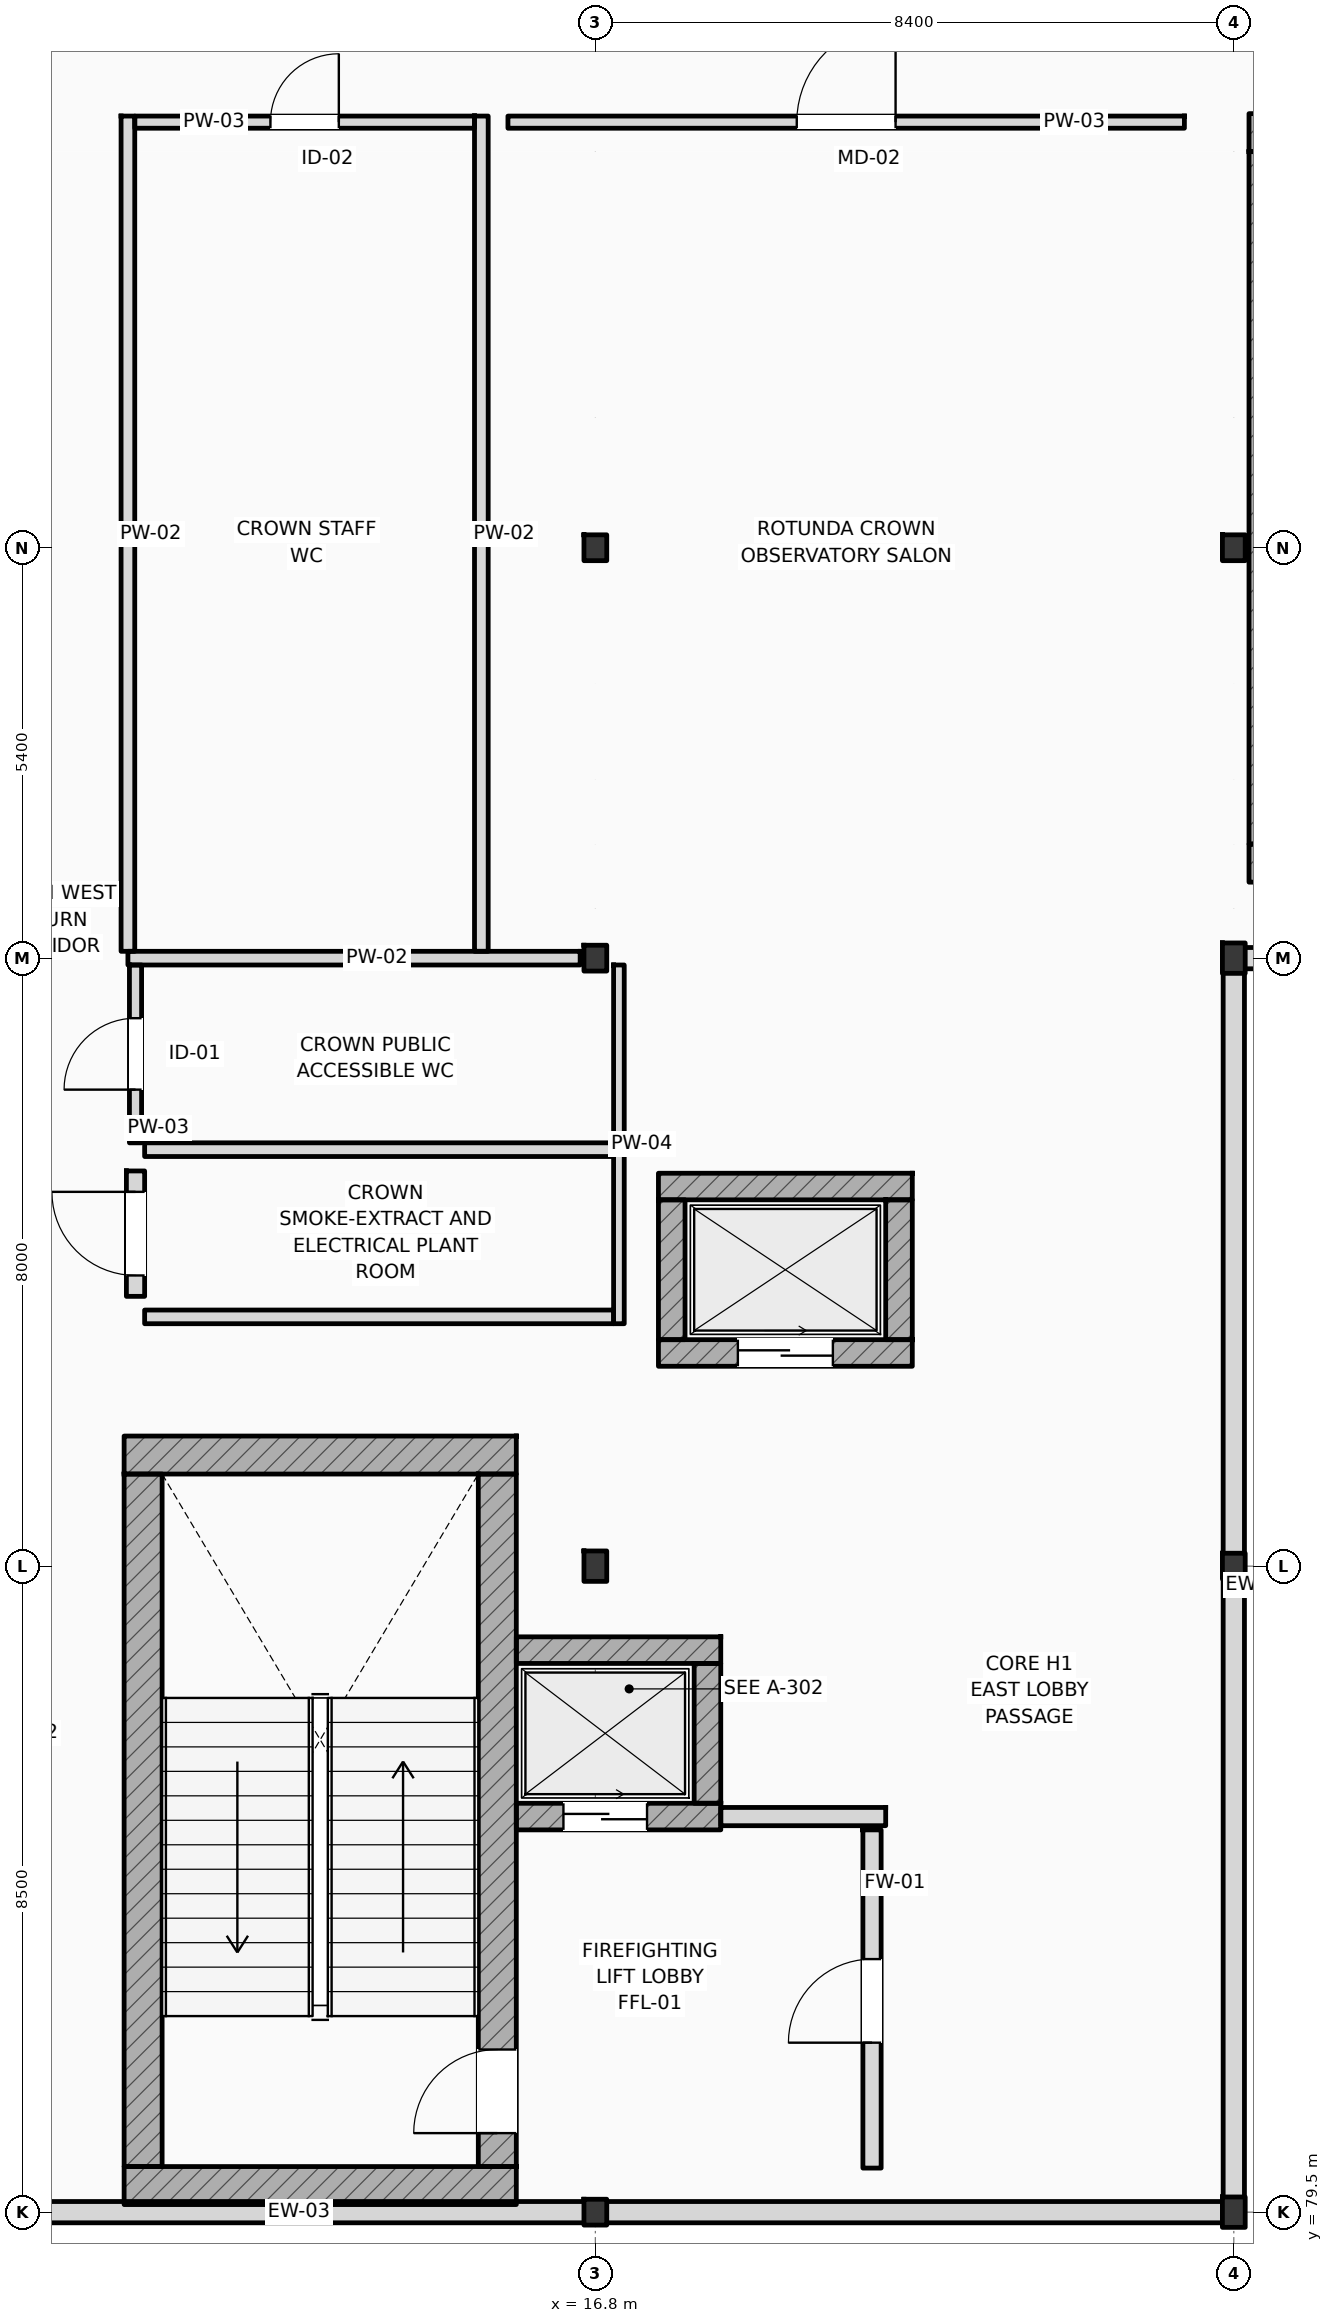
"""IFC4 building model, lengths in metres.
Left out: names, types, materials, properties, quantities, classifications, styles, units other than length and angle.
Written with IfcOpenShell. Run it as: python <this file> out.ifc"""

import sys

from ifc_helpers import new_model, si_unit, direction, frame, frame_2d, origin, origin_2d, place, context, subcontext, project, spatial, rectangle, i_section, extrude, element, fill, save


model = new_model("IFC4")
c1 = context("Model", 3, precision=1e-05, world=origin(), true_north=direction((0.0, 1.0)))
c2 = subcontext(c1, "Body", "Model", "MODEL_VIEW")
j1 = project(units=[si_unit("LENGTHUNIT", "METRE"), si_unit("PLANEANGLEUNIT", "RADIAN")], contexts=[c1])
p1 = place(None, origin())
s1 = spatial("IfcSite", under=j1, at=p1, CompositionType="ELEMENT")
p2 = place(p1, origin())
s2 = spatial("IfcBuilding", under=s1, at=p2, CompositionType="ELEMENT")
p3 = place(p2, frame((0.0, 0.0, 46.8)))
s3 = spatial("IfcBuildingStorey", under=s2, at=p3, CompositionType="ELEMENT", Elevation=46.8)
p4 = place(p3, frame((16.8, 79.5, 0.0), z_axis=(0.0, 0.0, 1.0), x_axis=(1.0, 0.0, 0.0)))
e1 = element("IfcColumn", 1, at=p4, inside=s3, PredefinedType="COLUMN", context=c2, shape_type="SweptSolid", body=[
    extrude(i_section(OverallWidth=0.3, OverallDepth=0.34, WebThickness=0.012, FlangeThickness=0.021, FilletRadius=0.027, at=origin_2d()), origin(), (0.0, 0.0, 1.0), 4.8),
])
p5 = place(p3, frame((16.8, 88.0, 0.0), z_axis=(0.0, 0.0, 1.0), x_axis=(1.0, 0.0, 0.0)))
e2 = element("IfcColumn", 2, at=p5, inside=s3, PredefinedType="COLUMN", context=c2, shape_type="SweptSolid", body=[
    extrude(i_section(OverallWidth=0.3, OverallDepth=0.4, WebThickness=0.013, FlangeThickness=0.024, FilletRadius=0.027, at=origin_2d()), origin(), (0.0, 0.0, 1.0), 4.8),
])
p6 = place(p3, frame((16.8, 96.0, 0.0), z_axis=(0.0, 0.0, 1.0), x_axis=(1.0, 0.0, 0.0)))
e3 = element("IfcColumn", 3, at=p6, inside=s3, PredefinedType="COLUMN", context=c2, shape_type="SweptSolid", body=[
    extrude(i_section(OverallWidth=0.3, OverallDepth=0.34, WebThickness=0.012, FlangeThickness=0.021, FilletRadius=0.027, at=origin_2d()), origin(), (0.0, 0.0, 1.0), 4.8),
])
p7 = place(p3, frame((25.2, 79.5, 0.0), z_axis=(0.0, 0.0, 1.0), x_axis=(1.0, 0.0, 0.0)))
e4 = element("IfcColumn", 4, at=p7, inside=s3, PredefinedType="COLUMN", context=c2, shape_type="SweptSolid", body=[
    extrude(i_section(OverallWidth=0.3, OverallDepth=0.4, WebThickness=0.013, FlangeThickness=0.024, FilletRadius=0.027, at=origin_2d()), origin(), (0.0, 0.0, 1.0), 4.8),
])
p8 = place(p3, frame((25.2, 88.0, 0.0), z_axis=(0.0, 0.0, 1.0), x_axis=(1.0, 0.0, 0.0)))
e5 = element("IfcColumn", 5, at=p8, inside=s3, PredefinedType="COLUMN", context=c2, shape_type="SweptSolid", body=[
    extrude(i_section(OverallWidth=0.3, OverallDepth=0.34, WebThickness=0.012, FlangeThickness=0.021, FilletRadius=0.027, at=origin_2d()), origin(), (0.0, 0.0, 1.0), 4.8),
])
p9 = place(p3, frame((25.2, 96.0, 0.0), z_axis=(0.0, 0.0, 1.0), x_axis=(1.0, 0.0, 0.0)))
e6 = element("IfcColumn", 6, at=p9, inside=s3, PredefinedType="COLUMN", context=c2, shape_type="SweptSolid", body=[
    extrude(i_section(OverallWidth=0.3, OverallDepth=0.4, WebThickness=0.013, FlangeThickness=0.024, FilletRadius=0.027, at=origin_2d()), origin(), (0.0, 0.0, 1.0), 4.8),
])
for number, where, z_axis, x_axis in (
    (7, (16.8, 101.4, 0.0), (0.0, 0.0, 1.0), (1.0, 0.0, 0.0)),
    (8, (25.2, 101.4, 0.0), (0.0, 0.0, 1.0), (1.0, 0.0, 0.0)),
):
    element("IfcColumn", number, at=place(p3, frame(where, z_axis=z_axis, x_axis=x_axis)), inside=s3, PredefinedType="COLUMN", context=c2, shape_type="SweptSolid", body=[
        extrude(i_section(OverallWidth=0.3, OverallDepth=0.34, WebThickness=0.012, FlangeThickness=0.021, FilletRadius=0.027, at=origin_2d()), origin(), (0.0, 0.0, 1.0), 4.8),
    ])
for number, where, z_axis, x_axis in (
    (9, (10.6, 89.462, 0.0), (0.0, 0.0, 1.0), (1.0, 0.0, 0.0)),
    (10, (10.6, 79.85, 0.0), (0.0, 0.0, 1.0), (1.0, 0.0, 0.0)),
):
    element("IfcWall", number, at=place(p3, frame(where, z_axis=z_axis, x_axis=x_axis)), inside=s3, PredefinedType="SHEAR", context=c2, shape_type="SweptSolid", body=[
        extrude(rectangle(XDim=5.16, YDim=0.5, at=frame_2d((2.58, 0.0))), origin(), (0.0, 0.0, 1.0), 4.8),
    ])
p10 = place(p3, frame((10.85, 80.1, 0.0), z_axis=(0.0, 0.0, 1.0), x_axis=(0.0, 1.0, 0.0)))
e11 = element("IfcWall", 11, at=p10, inside=s3, PredefinedType="SHEAR", context=c2, shape_type="SweptSolid", body=[
    extrude(rectangle(XDim=9.112, YDim=0.5, at=frame_2d((4.556, 0.0))), origin(), (0.0, 0.0, 1.0), 4.8),
])
p11 = place(p3, frame((15.51, 80.1, 0.0), z_axis=(0.0, 0.0, 1.0), x_axis=(0.0, 1.0, 0.0)))
e12 = element("IfcWall", 12, at=p11, inside=s3, PredefinedType="SHEAR", context=c2, shape_type="SweptSolid", body=[
    extrude(rectangle(XDim=9.112, YDim=0.5, at=frame_2d((4.556, 0.0))), origin(), (0.0, 0.0, 1.0), 4.8),
])
p12 = place(p11, frame((0.44, 0.0, 0.0)))
e13 = element("IfcOpeningElement", 13, at=p12, cuts=e12, PredefinedType="OPENING", context=c2, shape_type="SweptSolid", body=[
    extrude(rectangle(XDim=1.1, YDim=2.2, at=frame_2d((0.55, 1.1))), frame((0.0, 0.26, 0.0), z_axis=(0.0, -1.0, 0.0), x_axis=(1.0, 0.0, 0.0)), (0.0, 0.0, 1.0), 0.52),
])
for number, where, z_axis, x_axis in (
    (14, (25.4, 106.862, 0.0), (0.0, 0.0, 1.0), (1.0, 0.0, 0.0)),
    (15, (25.4, 97.25, 0.0), (0.0, 0.0, 1.0), (1.0, 0.0, 0.0)),
):
    element("IfcWall", number, at=place(p3, frame(where, z_axis=z_axis, x_axis=x_axis)), inside=s3, PredefinedType="SHEAR", context=c2, shape_type="SweptSolid", body=[
        extrude(rectangle(XDim=5.16, YDim=0.5, at=frame_2d((2.58, 0.0))), origin(), (0.0, 0.0, 1.0), 4.8),
    ])
p13 = place(p3, frame((25.65, 97.5, 0.0), z_axis=(0.0, 0.0, 1.0), x_axis=(0.0, 1.0, 0.0)))
e16 = element("IfcWall", 16, at=p13, inside=s3, PredefinedType="SHEAR", context=c2, shape_type="SweptSolid", body=[
    extrude(rectangle(XDim=9.112, YDim=0.5, at=frame_2d((4.556, 0.0))), origin(), (0.0, 0.0, 1.0), 4.8),
])
p14 = place(p3, frame((0.0, 79.5, 0.0), z_axis=(0.0, 0.0, 1.0), x_axis=(1.0, 0.0, 0.0)))
e17 = element("IfcWall", 17, at=p14, inside=s3, PredefinedType="STANDARD", context=c2, shape_type="SweptSolid", body=[
    extrude(rectangle(XDim=25.2, YDim=0.28, at=frame_2d((12.6, 0.0))), origin(), (0.0, 0.0, 1.0), 3.98),
])
p15 = place(p3, frame((25.2, 96.0, 0.0), z_axis=(0.0, 0.0, 1.0), x_axis=(1.0, 0.0, 0.0)))
e18 = element("IfcWall", 18, at=p15, inside=s3, PredefinedType="STANDARD", context=c2, shape_type="SweptSolid", body=[
    extrude(rectangle(XDim=54.6, YDim=0.28, at=frame_2d((27.3, 0.0))), origin(), (0.0, 0.0, 1.0), 4.08),
])
p16 = place(p3, frame((25.2, 79.5, 0.0), z_axis=(0.0, 0.0, 1.0), x_axis=(0.0, 1.0, 0.0)))
e19 = element("IfcWall", 19, at=p16, inside=s3, PredefinedType="STANDARD", context=c2, shape_type="SweptSolid", body=[
    extrude(rectangle(XDim=16.5, YDim=0.28, at=frame_2d((8.25, 0.0))), origin(), (0.0, 0.0, 1.0), 4.17),
])
p17 = place(p3, frame((15.76, 86.895, 0.0), z_axis=(0.0, 0.0, 1.0), x_axis=(1.0, 0.0, 0.0)))
e20 = element("IfcWall", 20, at=p17, inside=s3, PredefinedType="SHEAR", context=c2, shape_type="SweptSolid", body=[
    extrude(rectangle(XDim=2.69, YDim=0.35, at=frame_2d((1.345, 0.0))), origin(), (0.0, 0.0, 1.0), 4.54),
])
p18 = place(p3, frame((15.76, 84.705, 0.0), z_axis=(0.0, 0.0, 1.0), x_axis=(1.0, 0.0, 0.0)))
e21 = element("IfcWall", 21, at=p18, inside=s3, PredefinedType="SHEAR", context=c2, shape_type="SweptSolid", body=[
    extrude(rectangle(XDim=2.69, YDim=0.35, at=frame_2d((1.345, 0.0))), origin(), (0.0, 0.0, 1.0), 4.54),
])
p19 = place(p18, frame((0.62, 0.0, 0.0)))
e22 = element("IfcOpeningElement", 22, at=p19, cuts=e21, PredefinedType="OPENING", context=c2, shape_type="SweptSolid", body=[
    extrude(rectangle(XDim=1.1, YDim=2.2, at=frame_2d((0.55, 1.1))), frame((0.0, 0.185, 0.0), z_axis=(0.0, -1.0, 0.0), x_axis=(1.0, 0.0, 0.0)), (0.0, 0.0, 1.0), 0.37),
])
p20 = place(p3, frame((18.275, 84.88, 0.0), z_axis=(0.0, 0.0, 1.0), x_axis=(0.0, 1.0, 0.0)))
e23 = element("IfcWall", 23, at=p20, inside=s3, PredefinedType="SHEAR", context=c2, shape_type="SweptSolid", body=[
    extrude(rectangle(XDim=1.84, YDim=0.35, at=frame_2d((0.92, 0.0))), origin(), (0.0, 0.0, 1.0), 4.54),
])
p21 = place(p3, frame((17.63, 92.995, 0.0), z_axis=(0.0, 0.0, 1.0), x_axis=(1.0, 0.0, 0.0)))
e24 = element("IfcWall", 24, at=p21, inside=s3, PredefinedType="SHEAR", context=c2, shape_type="SweptSolid", body=[
    extrude(rectangle(XDim=3.34, YDim=0.35, at=frame_2d((1.67, 0.0))), origin(), (0.0, 0.0, 1.0), 4.54),
])
p22 = place(p3, frame((17.63, 90.805, 0.0), z_axis=(0.0, 0.0, 1.0), x_axis=(1.0, 0.0, 0.0)))
e25 = element("IfcWall", 25, at=p22, inside=s3, PredefinedType="SHEAR", context=c2, shape_type="SweptSolid", body=[
    extrude(rectangle(XDim=3.34, YDim=0.35, at=frame_2d((1.67, 0.0))), origin(), (0.0, 0.0, 1.0), 4.54),
])
p23 = place(p22, frame((1.045, 0.0, 0.0)))
e26 = element("IfcOpeningElement", 26, at=p23, cuts=e25, PredefinedType="OPENING", context=c2, shape_type="SweptSolid", body=[
    extrude(rectangle(XDim=1.25, YDim=2.25, at=frame_2d((0.625, 1.125))), frame((0.0, 0.185, 0.0), z_axis=(0.0, -1.0, 0.0), x_axis=(1.0, 0.0, 0.0)), (0.0, 0.0, 1.0), 0.37),
])
for number, where, z_axis, x_axis in (
    (27, (17.805, 90.98, 0.0), (0.0, 0.0, 1.0), (0.0, 1.0, 0.0)),
    (28, (20.795, 90.98, 0.0), (0.0, 0.0, 1.0), (0.0, 1.0, 0.0)),
):
    element("IfcWall", number, at=place(p3, frame(where, z_axis=z_axis, x_axis=x_axis)), inside=s3, PredefinedType="SHEAR", context=c2, shape_type="SweptSolid", body=[
        extrude(rectangle(XDim=1.84, YDim=0.35, at=frame_2d((0.92, 0.0))), origin(), (0.0, 0.0, 1.0), 4.54),
    ])
p24 = place(p3, frame((18.45, 84.705, 0.0), z_axis=(0.0, 0.0, 1.0), x_axis=(1.0, 0.0, 0.0)))
e29 = element("IfcWall", 29, at=p24, inside=s3, PredefinedType="STANDARD", context=c2, shape_type="SweptSolid", body=[
    extrude(rectangle(XDim=2.17, YDim=0.24, at=frame_2d((1.085, 0.0))), origin(), (0.0, 0.0, 1.0), 4.54),
])
p25 = place(p3, frame((20.44, 80.08, 0.0), z_axis=(0.0, 0.0, 1.0), x_axis=(0.0, 1.0, 0.0)))
e30 = element("IfcWall", 30, at=p25, inside=s3, PredefinedType="STANDARD", context=c2, shape_type="SweptSolid", body=[
    extrude(rectangle(XDim=4.45, YDim=0.24, at=frame_2d((2.225, 0.0))), origin(), (0.0, 0.0, 1.0), 4.54),
])
p26 = place(p25, frame((1.65, 0.0, 0.0)))
e31 = element("IfcOpeningElement", 31, at=p26, cuts=e30, PredefinedType="OPENING", context=c2, shape_type="SweptSolid", body=[
    extrude(rectangle(XDim=1.1, YDim=2.2, at=frame_2d((0.55, 1.1))), frame((0.0, 0.13, 0.0), z_axis=(0.0, -1.0, 0.0), x_axis=(1.0, 0.0, 0.0)), (0.0, 0.0, 1.0), 0.26),
])
p27 = place(p3, frame((15.65, 107.0, 0.0), z_axis=(0.0, 0.0, 1.0), x_axis=(1.0, 0.0, 0.0)))
e32 = element("IfcWall", 32, at=p27, inside=s3, PredefinedType="PARTITIONING", context=c2, shape_type="SweptSolid", body=[
    extrude(rectangle(XDim=8.9, YDim=0.16, at=frame_2d((4.45, 0.0))), origin(), (0.0, 0.0, 1.0), 4.54),
])
p28 = place(p27, frame((3.8, 0.0, 0.0)))
e33 = element("IfcOpeningElement", 33, at=p28, cuts=e32, PredefinedType="OPENING", context=c2, shape_type="SweptSolid", body=[
    extrude(rectangle(XDim=1.3, YDim=2.2, at=frame_2d((0.65, 1.1))), frame((0.0, 0.09, 0.0), z_axis=(0.0, -1.0, 0.0), x_axis=(1.0, 0.0, 0.0)), (0.0, 0.0, 1.0), 0.18),
])
p29 = place(p3, frame((10.75, 91.55, 0.0), z_axis=(0.0, 0.0, 1.0), x_axis=(0.0, 1.0, 0.0)))
e34 = element("IfcWall", 34, at=p29, inside=s3, PredefinedType="STANDARD", context=c2, shape_type="SweptSolid", body=[
    extrude(rectangle(XDim=1.65, YDim=0.24, at=frame_2d((0.825, 0.0))), origin(), (0.0, 0.0, 1.0), 4.54),
])
p30 = place(p29, frame((0.275, 0.0, 0.0)))
e35 = element("IfcOpeningElement", 35, at=p30, cuts=e34, PredefinedType="OPENING", context=c2, shape_type="SweptSolid", body=[
    extrude(rectangle(XDim=1.1, YDim=2.2, at=frame_2d((0.55, 1.1))), frame((0.0, 0.13, 0.0), z_axis=(0.0, -1.0, 0.0), x_axis=(1.0, 0.0, 0.0)), (0.0, 0.0, 1.0), 0.26),
])
p31 = place(p3, frame((10.75, 93.57, 0.0), z_axis=(0.0, 0.0, 1.0), x_axis=(0.0, 1.0, 0.0)))
e36 = element("IfcWall", 36, at=p31, inside=s3, PredefinedType="PARTITIONING", context=c2, shape_type="SweptSolid", body=[
    extrude(rectangle(XDim=2.34, YDim=0.16, at=frame_2d((1.17, 0.0))), origin(), (0.0, 0.0, 1.0), 4.54),
])
p32 = place(p31, frame((0.7, 0.0, 0.0)))
e37 = element("IfcOpeningElement", 37, at=p32, cuts=e36, PredefinedType="OPENING", context=c2, shape_type="SweptSolid", body=[
    extrude(rectangle(XDim=0.94, YDim=2.15, at=frame_2d((0.47, 1.075))), frame((0.0, 0.09, 0.0), z_axis=(0.0, -1.0, 0.0), x_axis=(1.0, 0.0, 0.0)), (0.0, 0.0, 1.0), 0.18),
])
p33 = place(p3, frame((10.74, 107.0, 0.0), z_axis=(0.0, 0.0, 1.0), x_axis=(1.0, 0.0, 0.0)))
e38 = element("IfcWall", 38, at=p33, inside=s3, PredefinedType="PARTITIONING", context=c2, shape_type="SweptSolid", body=[
    extrude(rectangle(XDim=4.47, YDim=0.16, at=frame_2d((2.235, 0.0))), origin(), (0.0, 0.0, 1.0), 4.54),
])
p34 = place(p33, frame((1.785, 0.0, 0.0)))
e39 = element("IfcOpeningElement", 39, at=p34, cuts=e38, PredefinedType="OPENING", context=c2, shape_type="SweptSolid", body=[
    extrude(rectangle(XDim=0.9, YDim=2.1, at=frame_2d((0.45, 1.05))), frame((0.0, 0.09, 0.0), z_axis=(0.0, -1.0, 0.0), x_axis=(1.0, 0.0, 0.0)), (0.0, 0.0, 1.0), 0.18),
])
for number, where, z_axis, x_axis in (
    (40, (10.87, 91.28, 0.0), (0.0, 0.0, 1.0), (1.0, 0.0, 0.0)),
    (41, (10.87, 93.48, 0.0), (0.0, 0.0, 1.0), (1.0, 0.0, 0.0)),
):
    element("IfcWall", number, at=place(p3, frame(where, z_axis=z_axis, x_axis=x_axis)), inside=s3, PredefinedType="PARTITIONING", context=c2, shape_type="SweptSolid", body=[
        extrude(rectangle(XDim=6.17, YDim=0.18, at=frame_2d((3.085, 0.0))), origin(), (0.0, 0.0, 1.0), 4.54),
    ])
p35 = place(p3, frame((17.11, 91.19, 0.0), z_axis=(0.0, 0.0, 1.0), x_axis=(0.0, 1.0, 0.0)))
e42 = element("IfcWall", 42, at=p35, inside=s3, PredefinedType="PARTITIONING", context=c2, shape_type="SweptSolid", body=[
    extrude(rectangle(XDim=4.72, YDim=0.14, at=frame_2d((2.36, 0.0))), origin(), (0.0, 0.0, 1.0), 4.54),
])
p36 = place(p3, frame((10.65, 96.0, 0.0), z_axis=(0.0, 0.0, 1.0), x_axis=(1.0, 0.0, 0.0)))
e43 = element("IfcWall", 43, at=p36, inside=s3, PredefinedType="PARTITIONING", context=c2, shape_type="SweptSolid", body=[
    extrude(rectangle(XDim=5.95, YDim=0.18, at=frame_2d((2.975, 0.0))), origin(), (0.0, 0.0, 1.0), 3.98),
])
for number, where, z_axis, x_axis in (
    (44, (10.65, 96.09, 0.0), (0.0, 0.0, 1.0), (0.0, 1.0, 0.0)),
    (45, (15.3, 96.09, 0.0), (0.0, 0.0, 1.0), (0.0, 1.0, 0.0)),
):
    element("IfcWall", number, at=place(p3, frame(where, z_axis=z_axis, x_axis=x_axis)), inside=s3, PredefinedType="PARTITIONING", context=c2, shape_type="SweptSolid", body=[
        extrude(rectangle(XDim=10.99, YDim=0.18, at=frame_2d((5.495, 0.0))), origin(), (0.0, 0.0, 1.0), 4.54),
    ])
p37 = place(p12, origin())
e46 = element("IfcDoor", 46, at=p37, inside=s3, OperationType="SINGLE_SWING_LEFT", PredefinedType="DOOR", context=c2, shape_type="SweptSolid", body=[
    extrude(rectangle(XDim=1.1, YDim=2.2, at=frame_2d((0.55, 1.1))), frame((0.0, 0.025, 0.0), z_axis=(0.0, -1.0, 0.0), x_axis=(1.0, 0.0, 0.0)), (0.0, 0.0, 1.0), 0.05),
])
fill(e13, e46)
p38 = place(p19, origin())
e47 = element("IfcDoor", 47, at=p38, inside=s3, OperationType="SLIDING_TO_LEFT", PredefinedType="DOOR", context=c2, shape_type="SweptSolid", body=[
    extrude(rectangle(XDim=1.1, YDim=2.2, at=frame_2d((0.55, 1.1))), frame((0.0, 0.025, 0.0), z_axis=(0.0, -1.0, 0.0), x_axis=(1.0, 0.0, 0.0)), (0.0, 0.0, 1.0), 0.05),
])
fill(e22, e47)
p39 = place(p23, origin())
e48 = element("IfcDoor", 48, at=p39, inside=s3, OperationType="SLIDING_TO_LEFT", PredefinedType="DOOR", context=c2, shape_type="SweptSolid", body=[
    extrude(rectangle(XDim=1.25, YDim=2.25, at=frame_2d((0.625, 1.125))), frame((0.0, 0.025, 0.0), z_axis=(0.0, -1.0, 0.0), x_axis=(1.0, 0.0, 0.0)), (0.0, 0.0, 1.0), 0.05),
])
fill(e26, e48)
p40 = place(p26, origin())
e49 = element("IfcDoor", 49, at=p40, inside=s3, OperationType="SINGLE_SWING_LEFT", PredefinedType="DOOR", context=c2, shape_type="SweptSolid", body=[
    extrude(rectangle(XDim=1.1, YDim=2.2, at=frame_2d((0.55, 1.1))), frame((0.0, 0.025, 0.0), z_axis=(0.0, -1.0, 0.0), x_axis=(1.0, 0.0, 0.0)), (0.0, 0.0, 1.0), 0.05),
])
fill(e31, e49)
p41 = place(p28, origin())
e50 = element("IfcDoor", 50, at=p41, inside=s3, OperationType="SINGLE_SWING_RIGHT", PredefinedType="DOOR", context=c2, shape_type="SweptSolid", body=[
    extrude(rectangle(XDim=1.3, YDim=2.2, at=frame_2d((0.65, 1.1))), frame((0.0, 0.025, 0.0), z_axis=(0.0, -1.0, 0.0), x_axis=(1.0, 0.0, 0.0)), (0.0, 0.0, 1.0), 0.05),
])
fill(e33, e50)
p42 = place(p30, origin())
e51 = element("IfcDoor", 51, at=p42, inside=s3, OperationType="SINGLE_SWING_RIGHT", PredefinedType="DOOR", context=c2, shape_type="SweptSolid", body=[
    extrude(rectangle(XDim=1.1, YDim=2.2, at=frame_2d((0.55, 1.1))), frame((0.0, 0.025, 0.0), z_axis=(0.0, -1.0, 0.0), x_axis=(1.0, 0.0, 0.0)), (0.0, 0.0, 1.0), 0.05),
])
fill(e35, e51)
p43 = place(p32, origin())
e52 = element("IfcDoor", 52, at=p43, inside=s3, OperationType="SINGLE_SWING_LEFT", PredefinedType="DOOR", context=c2, shape_type="SweptSolid", body=[
    extrude(rectangle(XDim=0.94, YDim=2.15, at=frame_2d((0.47, 1.075))), frame((0.0, 0.025, 0.0), z_axis=(0.0, -1.0, 0.0), x_axis=(1.0, 0.0, 0.0)), (0.0, 0.0, 1.0), 0.05),
])
fill(e37, e52)
p44 = place(p34, origin())
e53 = element("IfcDoor", 53, at=p44, inside=s3, OperationType="SINGLE_SWING_RIGHT", PredefinedType="DOOR", context=c2, shape_type="SweptSolid", body=[
    extrude(rectangle(XDim=0.9, YDim=2.1, at=frame_2d((0.45, 1.05))), frame((0.0, 0.025, 0.0), z_axis=(0.0, -1.0, 0.0), x_axis=(1.0, 0.0, 0.0)), (0.0, 0.0, 1.0), 0.05),
])
fill(e39, e53)
save(model, sys.argv[1])
